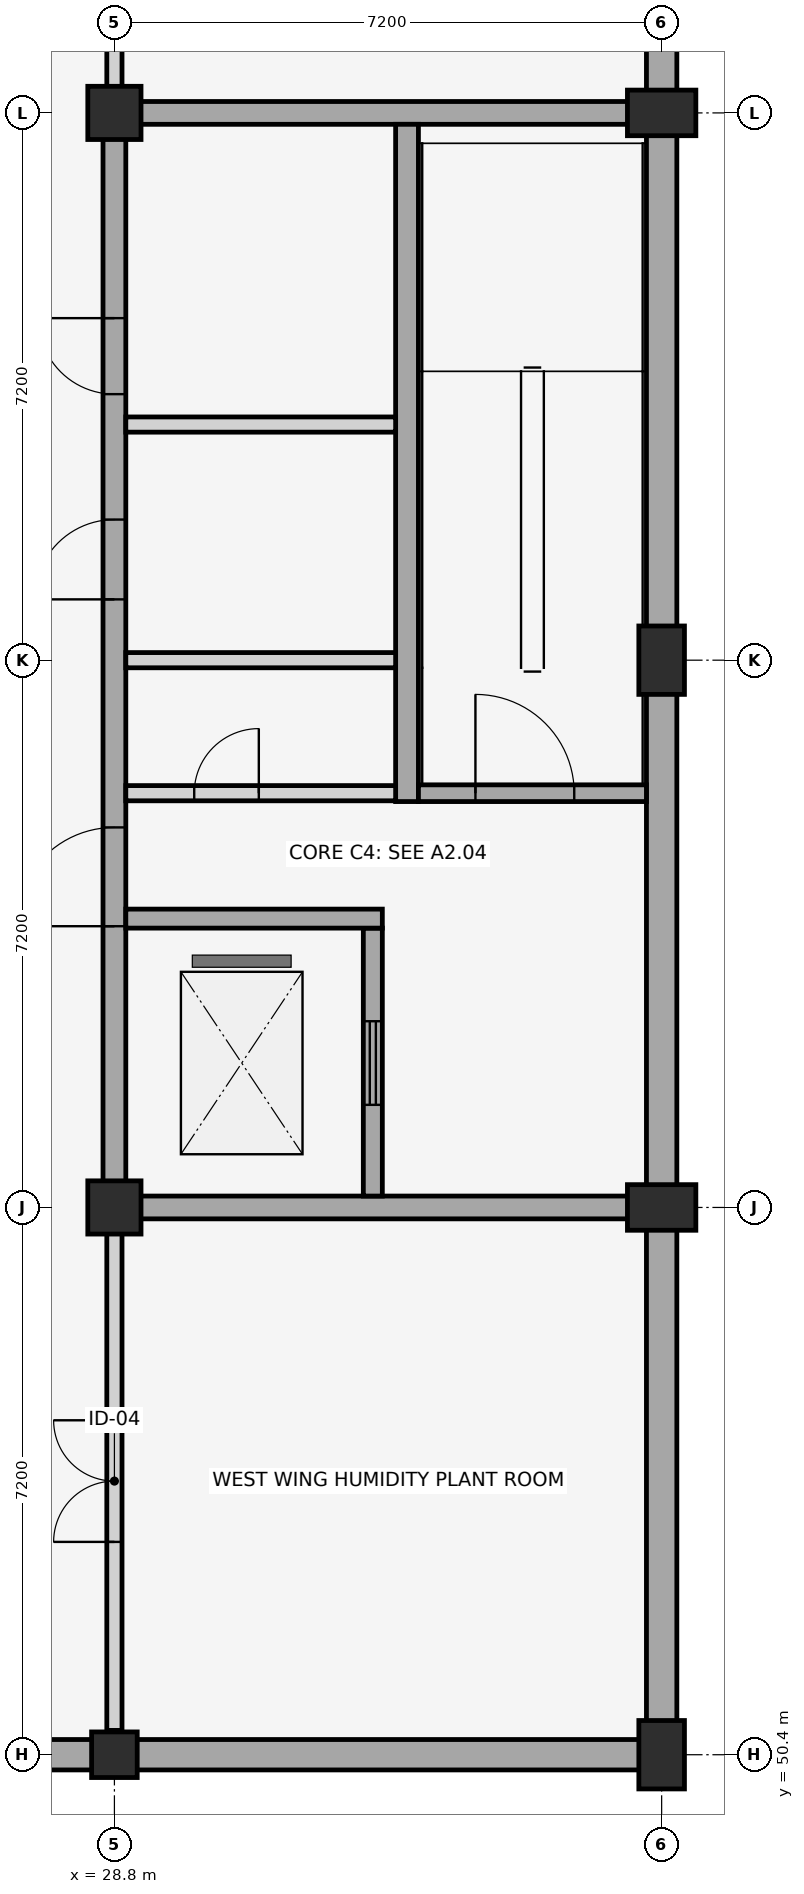
"""IFC4 building model, lengths in metres.
Left out: names, types, materials, properties, quantities, classifications, styles, units other than length and angle.
Written with IfcOpenShell. Run it as: python <this file> out.ifc"""

import sys

from ifc_helpers import new_model, si_unit, direction, frame, frame_2d, origin, origin_2d, place, context, subcontext, project, spatial, rectangle, extrude, element, fill, save


model = new_model("IFC4")
c1 = context("Model", 3, precision=1e-05, world=origin(), true_north=direction((0.0, 1.0)))
c2 = subcontext(c1, "Body", "Model", "MODEL_VIEW")
j1 = project(units=[si_unit("LENGTHUNIT", "METRE"), si_unit("PLANEANGLEUNIT", "RADIAN")], contexts=[c1])
p1 = place(None, origin())
s1 = spatial("IfcSite", under=j1, at=p1, CompositionType="ELEMENT")
p2 = place(p1, origin())
s2 = spatial("IfcBuilding", under=s1, at=p2, CompositionType="ELEMENT")
p3 = place(p2, frame((0.0, 0.0, -4.5)))
s3 = spatial("IfcBuildingStorey", under=s2, at=p3, CompositionType="ELEMENT", Elevation=-4.5)
p4 = place(p3, frame((7.0, 50.4, 0.0), z_axis=(0.0, 0.0, 1.0), x_axis=(1.0, 0.0, 0.0)))
e1 = element("IfcWall", 1, at=p4, inside=s3, PredefinedType="USERDEFINED", context=c2, shape_type="SweptSolid", body=[
    extrude(rectangle(XDim=29.2, YDim=0.4, at=frame_2d((14.6, 0.0))), origin(), (0.0, 0.0, 1.0), 3.67),
])
p5 = place(p3, frame((36.0, 50.6, 0.0), z_axis=(0.0, 0.0, 1.0), x_axis=(0.0, 1.0, 0.0)))
e2 = element("IfcWall", 2, at=p5, inside=s3, PredefinedType="USERDEFINED", context=c2, shape_type="SweptSolid", body=[
    extrude(rectangle(XDim=50.0, YDim=0.4, at=frame_2d((25.0, 0.0))), origin(), (0.0, 0.0, 1.0), 3.67),
])
p6 = place(p3, frame((28.8, 50.4, -0.45), z_axis=(0.0, 0.0, 1.0), x_axis=(0.0, 1.0, 0.0)))
e3 = element("IfcColumn", 3, at=p6, inside=s3, PredefinedType="COLUMN", context=c2, shape_type="SweptSolid", body=[
    extrude(rectangle(XDim=0.6, YDim=0.6, at=origin_2d()), origin(), (0.0, 0.0, 1.0), 4.95),
])
for number, where, z_axis, x_axis in (
    (4, (28.8, 57.6, -0.45), (0.0, 0.0, 1.0), (1.0, 0.0, 0.0)),
    (5, (28.8, 72.0, -0.45), (0.0, 0.0, 1.0), (1.0, 0.0, 0.0)),
):
    element("IfcColumn", number, at=place(p3, frame(where, z_axis=z_axis, x_axis=x_axis)), inside=s3, PredefinedType="COLUMN", context=c2, shape_type="SweptSolid", body=[
        extrude(rectangle(XDim=0.7, YDim=0.7, at=origin_2d()), origin(), (0.0, 0.0, 1.0), 4.95),
    ])
for number, where, z_axis, x_axis in (
    (6, (36.0, 50.4, -0.45), (0.0, 0.0, 1.0), (1.0, 0.0, 0.0)),
    (7, (36.0, 57.6, -0.45), (0.0, 0.0, 1.0), (0.0, 1.0, 0.0)),
    (8, (36.0, 64.8, -0.45), (0.0, 0.0, 1.0), (1.0, 0.0, 0.0)),
    (9, (36.0, 72.0, -0.45), (0.0, 0.0, 1.0), (0.0, 1.0, 0.0)),
):
    element("IfcColumn", number, at=place(p3, frame(where, z_axis=z_axis, x_axis=x_axis)), inside=s3, PredefinedType="PILASTER", context=c2, shape_type="SweptSolid", body=[
        extrude(rectangle(XDim=0.6, YDim=0.9, at=origin_2d()), origin(), (0.0, 0.0, 1.0), 4.95),
    ])
for number, where, z_axis, x_axis in (
    (10, (28.65, 57.6, 0.0), (0.0, 0.0, 1.0), (1.0, 0.0, 0.0)),
    (11, (28.65, 72.0, 0.0), (0.0, 0.0, 1.0), (1.0, 0.0, 0.0)),
):
    element("IfcWall", number, at=place(p3, frame(where, z_axis=z_axis, x_axis=x_axis)), inside=s3, PredefinedType="SHEAR", context=c2, shape_type="SweptSolid", body=[
        extrude(rectangle(XDim=7.15, YDim=0.3, at=frame_2d((3.575, 0.0))), origin(), (0.0, 0.0, 1.0), 4.25),
    ])
p7 = place(p3, frame((28.8, 57.75, 0.0), z_axis=(0.0, 0.0, 1.0), x_axis=(0.0, 1.0, 0.0)))
e12 = element("IfcWall", 12, at=p7, inside=s3, PredefinedType="SHEAR", context=c2, shape_type="SweptSolid", body=[
    extrude(rectangle(XDim=14.1, YDim=0.3, at=frame_2d((7.05, 0.0))), origin(), (0.0, 0.0, 1.0), 4.25),
])
p8 = place(p7, frame((3.55, 0.0, 0.0)))
e13 = element("IfcOpeningElement", 13, at=p8, cuts=e12, PredefinedType="OPENING", context=c2, shape_type="SweptSolid", body=[
    extrude(rectangle(XDim=1.3, YDim=2.2, at=frame_2d((0.65, 1.1))), frame((0.0, 0.16, 0.0), z_axis=(0.0, -1.0, 0.0), x_axis=(1.0, 0.0, 0.0)), (0.0, 0.0, 1.0), 0.32),
])
p9 = place(p7, frame((7.85, 0.0, 0.0)))
e14 = element("IfcOpeningElement", 14, at=p9, cuts=e12, PredefinedType="OPENING", context=c2, shape_type="SweptSolid", body=[
    extrude(rectangle(XDim=1.05, YDim=2.15, at=frame_2d((0.525, 1.075))), frame((0.0, 0.16, 0.0), z_axis=(0.0, -1.0, 0.0), x_axis=(1.0, 0.0, 0.0)), (0.0, 0.0, 1.0), 0.32),
])
p10 = place(p7, frame((10.55, 0.0, 0.0)))
e15 = element("IfcOpeningElement", 15, at=p10, cuts=e12, PredefinedType="OPENING", context=c2, shape_type="SweptSolid", body=[
    extrude(rectangle(XDim=1.0, YDim=2.15, at=frame_2d((0.5, 1.075))), frame((0.0, 0.16, 0.0), z_axis=(0.0, -1.0, 0.0), x_axis=(1.0, 0.0, 0.0)), (0.0, 0.0, 1.0), 0.32),
])
p11 = place(p3, frame((32.2, 57.75, 0.0), z_axis=(0.0, 0.0, 1.0), x_axis=(0.0, 1.0, 0.0)))
e16 = element("IfcWall", 16, at=p11, inside=s3, PredefinedType="SHEAR", context=c2, shape_type="SweptSolid", body=[
    extrude(rectangle(XDim=3.525, YDim=0.25, at=frame_2d((1.762, 0.0))), origin(), (0.0, 0.0, 1.0), 4.25),
])
p12 = place(p11, frame((1.2, 0.0, 0.0)))
e17 = element("IfcOpeningElement", 17, at=p12, cuts=e16, PredefinedType="OPENING", context=c2, shape_type="SweptSolid", body=[
    extrude(rectangle(XDim=1.1, YDim=2.15, at=frame_2d((0.55, 1.075))), frame((0.0, 0.135, 0.0), z_axis=(0.0, -1.0, 0.0), x_axis=(1.0, 0.0, 0.0)), (0.0, 0.0, 1.0), 0.27),
])
p13 = place(p3, frame((32.65, 62.94, 0.0), z_axis=(0.0, 0.0, 1.0), x_axis=(0.0, 1.0, 0.0)))
e18 = element("IfcWall", 18, at=p13, inside=s3, PredefinedType="SHEAR", context=c2, shape_type="SweptSolid", body=[
    extrude(rectangle(XDim=8.91, YDim=0.3, at=frame_2d((4.455, 0.0))), origin(), (0.0, 0.0, 1.0), 4.25),
])
p14 = place(p3, frame((28.95, 63.05, 0.0), z_axis=(0.0, 0.0, 1.0), x_axis=(1.0, 0.0, 0.0)))
e19 = element("IfcWall", 19, at=p14, inside=s3, PredefinedType="PLUMBINGWALL", context=c2, shape_type="SweptSolid", body=[
    extrude(rectangle(XDim=3.55, YDim=0.2, at=frame_2d((1.775, 0.0))), origin(), (0.0, 0.0, 1.0), 3.67),
])
p15 = place(p14, frame((0.9, 0.0, 0.0)))
e20 = element("IfcOpeningElement", 20, at=p15, cuts=e19, PredefinedType="OPENING", context=c2, shape_type="SweptSolid", body=[
    extrude(rectangle(XDim=0.85, YDim=2.05, at=frame_2d((0.425, 1.025))), frame((0.0, 0.11, 0.0), z_axis=(0.0, -1.0, 0.0), x_axis=(1.0, 0.0, 0.0)), (0.0, 0.0, 1.0), 0.22),
])
p16 = place(p3, frame((32.8, 63.05, 0.0), z_axis=(0.0, 0.0, 1.0), x_axis=(1.0, 0.0, 0.0)))
e21 = element("IfcWall", 21, at=p16, inside=s3, PredefinedType="SHEAR", context=c2, shape_type="SweptSolid", body=[
    extrude(rectangle(XDim=3.0, YDim=0.22, at=frame_2d((1.5, 0.0))), origin(), (0.0, 0.0, 1.0), 4.25),
])
p17 = place(p16, frame((0.75, 0.0, 0.0)))
e22 = element("IfcOpeningElement", 22, at=p17, cuts=e21, PredefinedType="OPENING", context=c2, shape_type="SweptSolid", body=[
    extrude(rectangle(XDim=1.3, YDim=2.2, at=frame_2d((0.65, 1.1))), frame((0.0, 0.12, 0.0), z_axis=(0.0, -1.0, 0.0), x_axis=(1.0, 0.0, 0.0)), (0.0, 0.0, 1.0), 0.24),
])
p18 = place(p3, frame((28.95, 61.4, 0.0), z_axis=(0.0, 0.0, 1.0), x_axis=(1.0, 0.0, 0.0)))
e23 = element("IfcWall", 23, at=p18, inside=s3, PredefinedType="SHEAR", context=c2, shape_type="SweptSolid", body=[
    extrude(rectangle(XDim=3.375, YDim=0.25, at=frame_2d((1.688, 0.0))), origin(), (0.0, 0.0, 1.0), 4.25),
])
for number, where, z_axis, x_axis in (
    (24, (28.95, 64.8, 0.0), (0.0, 0.0, 1.0), (1.0, 0.0, 0.0)),
    (25, (28.95, 67.9, 0.0), (0.0, 0.0, 1.0), (1.0, 0.0, 0.0)),
):
    element("IfcWall", number, at=place(p3, frame(where, z_axis=z_axis, x_axis=x_axis)), inside=s3, PredefinedType="PLUMBINGWALL", context=c2, shape_type="SweptSolid", body=[
        extrude(rectangle(XDim=3.55, YDim=0.2, at=frame_2d((1.775, 0.0))), origin(), (0.0, 0.0, 1.0), 3.67),
    ])
p19 = place(p3, frame((28.8, 72.32, 0.0), z_axis=(0.0, 0.0, 1.0), x_axis=(0.0, 1.0, 0.0)))
e26 = element("IfcWall", 26, at=p19, inside=s3, PredefinedType="PARTITIONING", context=c2, shape_type="SweptSolid", body=[
    extrude(rectangle(XDim=28.16, YDim=0.2, at=frame_2d((14.08, 0.0))), origin(), (0.0, 0.0, 1.0), 3.45),
])
p20 = place(p19, frame((1.649, 0.0, 0.0)))
e27 = element("IfcOpeningElement", 27, at=p20, cuts=e26, PredefinedType="OPENING", context=c2, shape_type="SweptSolid", body=[
    extrude(rectangle(XDim=1.6, YDim=2.35, at=frame_2d((0.8, 1.175))), frame((0.0, 0.11, 0.0), z_axis=(0.0, -1.0, 0.0), x_axis=(1.0, 0.0, 0.0)), (0.0, 0.0, 1.0), 0.22),
])
p21 = place(p3, frame((28.8, 50.72, 0.0), z_axis=(0.0, 0.0, 1.0), x_axis=(0.0, 1.0, 0.0)))
e28 = element("IfcWall", 28, at=p21, inside=s3, PredefinedType="PARTITIONING", context=c2, shape_type="SweptSolid", body=[
    extrude(rectangle(XDim=6.56, YDim=0.2, at=frame_2d((3.28, 0.0))), origin(), (0.0, 0.0, 1.0), 3.45),
])
p22 = place(p21, frame((2.48, 0.0, 0.0)))
e29 = element("IfcOpeningElement", 29, at=p22, cuts=e28, PredefinedType="OPENING", context=c2, shape_type="SweptSolid", body=[
    extrude(rectangle(XDim=1.6, YDim=2.35, at=frame_2d((0.8, 1.175))), frame((0.0, 0.11, 0.0), z_axis=(0.0, -1.0, 0.0), x_axis=(1.0, 0.0, 0.0)), (0.0, 0.0, 1.0), 0.22),
])
p23 = place(p8, origin())
e30 = element("IfcDoor", 30, at=p23, inside=s3, OperationType="SINGLE_SWING_LEFT", PredefinedType="DOOR", context=c2, shape_type="SweptSolid", body=[
    extrude(rectangle(XDim=1.3, YDim=2.2, at=frame_2d((0.65, 1.1))), frame((0.0, 0.025, 0.0), z_axis=(0.0, -1.0, 0.0), x_axis=(1.0, 0.0, 0.0)), (0.0, 0.0, 1.0), 0.05),
])
fill(e13, e30)
p24 = place(p9, origin())
e31 = element("IfcDoor", 31, at=p24, inside=s3, OperationType="SINGLE_SWING_LEFT", PredefinedType="DOOR", context=c2, shape_type="SweptSolid", body=[
    extrude(rectangle(XDim=1.05, YDim=2.15, at=frame_2d((0.525, 1.075))), frame((0.0, 0.025, 0.0), z_axis=(0.0, -1.0, 0.0), x_axis=(1.0, 0.0, 0.0)), (0.0, 0.0, 1.0), 0.05),
])
fill(e14, e31)
p25 = place(p10, origin())
e32 = element("IfcDoor", 32, at=p25, inside=s3, OperationType="SINGLE_SWING_RIGHT", PredefinedType="DOOR", context=c2, shape_type="SweptSolid", body=[
    extrude(rectangle(XDim=1.0, YDim=2.15, at=frame_2d((0.5, 1.075))), frame((0.0, 0.025, 0.0), z_axis=(0.0, -1.0, 0.0), x_axis=(1.0, 0.0, 0.0)), (0.0, 0.0, 1.0), 0.05),
])
fill(e15, e32)
p26 = place(p12, origin())
e33 = element("IfcDoor", 33, at=p26, inside=s3, OperationType="SLIDING_TO_LEFT", PredefinedType="DOOR", context=c2, shape_type="SweptSolid", body=[
    extrude(rectangle(XDim=1.1, YDim=2.15, at=frame_2d((0.55, 1.075))), frame((0.0, 0.025, 0.0), z_axis=(0.0, -1.0, 0.0), x_axis=(1.0, 0.0, 0.0)), (0.0, 0.0, 1.0), 0.05),
])
fill(e17, e33)
p27 = place(p15, origin())
e34 = element("IfcDoor", 34, at=p27, inside=s3, OperationType="SINGLE_SWING_RIGHT", PredefinedType="TRAPDOOR", context=c2, shape_type="SweptSolid", body=[
    extrude(rectangle(XDim=0.85, YDim=2.05, at=frame_2d((0.425, 1.025))), frame((0.0, 0.025, 0.0), z_axis=(0.0, -1.0, 0.0), x_axis=(1.0, 0.0, 0.0)), (0.0, 0.0, 1.0), 0.05),
])
fill(e20, e34)
p28 = place(p17, origin())
e35 = element("IfcDoor", 35, at=p28, inside=s3, OperationType="SINGLE_SWING_LEFT", PredefinedType="DOOR", context=c2, shape_type="SweptSolid", body=[
    extrude(rectangle(XDim=1.3, YDim=2.2, at=frame_2d((0.65, 1.1))), frame((0.0, 0.025, 0.0), z_axis=(0.0, -1.0, 0.0), x_axis=(1.0, 0.0, 0.0)), (0.0, 0.0, 1.0), 0.05),
])
fill(e22, e35)
p29 = place(p22, origin())
e36 = element("IfcDoor", 36, at=p29, inside=s3, OperationType="DOUBLE_DOOR_SINGLE_SWING", PredefinedType="DOOR", context=c2, shape_type="SweptSolid", body=[
    extrude(rectangle(XDim=1.6, YDim=2.35, at=frame_2d((0.8, 1.175))), frame((0.0, 0.025, 0.0), z_axis=(0.0, -1.0, 0.0), x_axis=(1.0, 0.0, 0.0)), (0.0, 0.0, 1.0), 0.05),
])
fill(e29, e36)
save(model, sys.argv[1])
